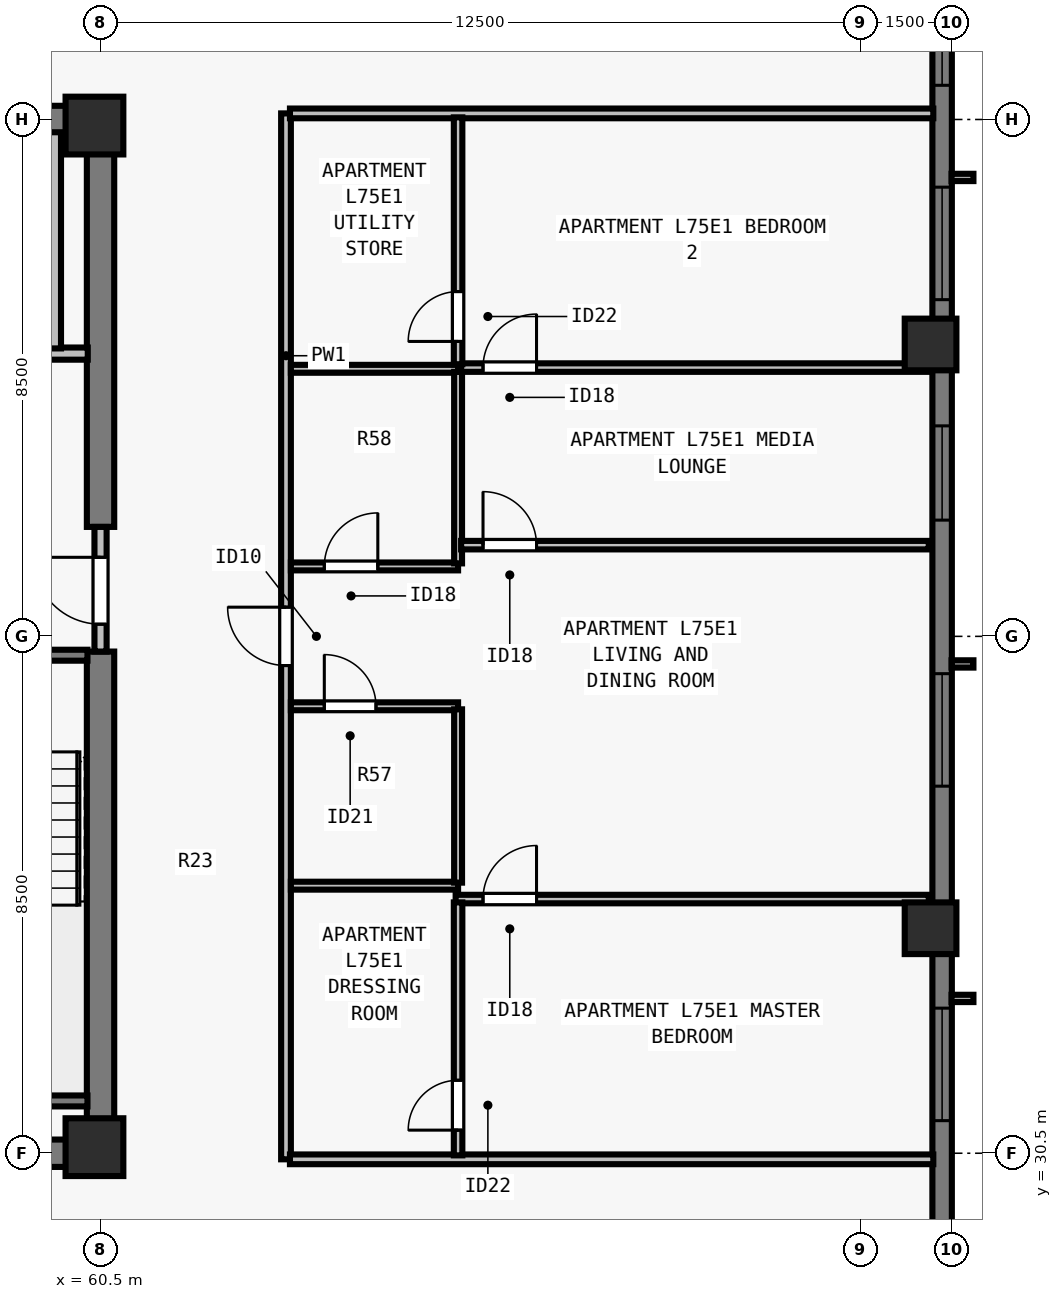
"""IFC4 building model, lengths in metres.
Left out: names, types, materials, properties, quantities, classifications, styles, units other than length and angle.
Written with IfcOpenShell. Run it as: python <this file> out.ifc"""

import sys

from ifc_helpers import new_model, si_unit, direction, frame, frame_2d, origin, origin_2d, place, context, subcontext, project, spatial, rectangle, extrude, element, fill, save


model = new_model("IFC4")
c1 = context("Model", 3, precision=1e-05, world=origin(), true_north=direction((0.0, 1.0)))
c2 = subcontext(c1, "Body", "Model", "MODEL_VIEW")
j1 = project(units=[si_unit("LENGTHUNIT", "METRE"), si_unit("PLANEANGLEUNIT", "RADIAN")], contexts=[c1])
p1 = place(None, origin())
s1 = spatial("IfcSite", under=j1, at=p1, CompositionType="ELEMENT")
p2 = place(p1, origin())
s2 = spatial("IfcBuilding", under=s1, at=p2, CompositionType="ELEMENT")
p3 = place(p2, frame((0.0, 0.0, 272.5)))
s3 = spatial("IfcBuildingStorey", under=s2, at=p3, CompositionType="ELEMENT", Elevation=272.5)
for number, where, z_axis, x_axis in (
    (1, (60.4, 30.6, 0.0), (0.0, 0.0, 1.0), (1.0, 0.0, 0.0)),
    (2, (60.4, 47.4, 0.0), (0.0, 0.0, 1.0), (1.0, 0.0, 0.0)),
):
    element("IfcColumn", number, at=place(p3, frame(where, z_axis=z_axis, x_axis=x_axis)), inside=s3, PredefinedType="COLUMN", context=c2, shape_type="SweptSolid", body=[
        extrude(rectangle(XDim=0.95, YDim=0.95, at=origin_2d()), origin(), (0.0, 0.0, 1.0), 3.5),
    ])
for number, where, z_axis, x_axis in (
    (3, (74.15, 34.2, 0.0), (0.0, 0.0, 1.0), (0.0, 1.0, 0.0)),
    (4, (74.15, 43.8, 0.0), (0.0, 0.0, 1.0), (0.0, 1.0, 0.0)),
):
    element("IfcColumn", number, at=place(p3, frame(where, z_axis=z_axis, x_axis=x_axis)), inside=s3, PredefinedType="COLUMN", context=c2, shape_type="SweptSolid", body=[
        extrude(rectangle(XDim=0.85, YDim=0.85, at=origin_2d()), origin(), (0.0, 0.0, 1.0), 3.5),
    ])
p4 = place(p3, frame((74.34, 56.5, 0.0), z_axis=(0.0, 0.0, 1.0), x_axis=(0.0, -1.0, 0.0)))
e5 = element("IfcWall", 5, at=p4, inside=s3, PredefinedType="SOLIDWALL", context=c2, shape_type="SweptSolid", body=[
    extrude(rectangle(XDim=34.702, YDim=0.32, at=frame_2d((17.351, 0.0))), origin(), (0.0, 0.0, 1.0), 3.24),
])
p5 = place(p4, frame((6.888, 0.0, 0.8)))
e6 = element("IfcOpeningElement", 6, at=p5, cuts=e5, PredefinedType="OPENING", context=c2, shape_type="SweptSolid", body=[
    extrude(rectangle(XDim=1.55, YDim=1.628, at=frame_2d((0.775, 0.814))), frame((0.0, 0.17, 0.0), z_axis=(0.0, -1.0, 0.0), x_axis=(1.0, 0.0, 0.0)), (0.0, 0.0, 1.0), 0.34),
])
p6 = place(p4, frame((10.113, 0.0, 0.8)))
e7 = element("IfcOpeningElement", 7, at=p6, cuts=e5, PredefinedType="OPENING", context=c2, shape_type="SweptSolid", body=[
    extrude(rectangle(XDim=1.85, YDim=1.628, at=frame_2d((0.925, 0.814))), frame((0.0, 0.17, 0.0), z_axis=(0.0, -1.0, 0.0), x_axis=(1.0, 0.0, 0.0)), (0.0, 0.0, 1.0), 0.34),
])
p7 = place(p4, frame((14.038, 0.0, 0.8)))
e8 = element("IfcOpeningElement", 8, at=p7, cuts=e5, PredefinedType="OPENING", context=c2, shape_type="SweptSolid", body=[
    extrude(rectangle(XDim=1.55, YDim=1.628, at=frame_2d((0.775, 0.814))), frame((0.0, 0.17, 0.0), z_axis=(0.0, -1.0, 0.0), x_axis=(1.0, 0.0, 0.0)), (0.0, 0.0, 1.0), 0.34),
])
p8 = place(p4, frame((18.114, 0.0, 0.8)))
e9 = element("IfcOpeningElement", 9, at=p8, cuts=e5, PredefinedType="OPENING", context=c2, shape_type="SweptSolid", body=[
    extrude(rectangle(XDim=1.85, YDim=1.628, at=frame_2d((0.925, 0.814))), frame((0.0, 0.17, 0.0), z_axis=(0.0, -1.0, 0.0), x_axis=(1.0, 0.0, 0.0)), (0.0, 0.0, 1.0), 0.34),
])
p9 = place(p4, frame((23.614, 0.0, 0.8)))
e10 = element("IfcOpeningElement", 10, at=p9, cuts=e5, PredefinedType="OPENING", context=c2, shape_type="SweptSolid", body=[
    extrude(rectangle(XDim=1.85, YDim=1.628, at=frame_2d((0.925, 0.814))), frame((0.0, 0.17, 0.0), z_axis=(0.0, -1.0, 0.0), x_axis=(1.0, 0.0, 0.0)), (0.0, 0.0, 1.0), 0.34),
])
p10 = place(p4, frame((29.24, 0.0, 0.8)))
e11 = element("IfcOpeningElement", 11, at=p10, cuts=e5, PredefinedType="OPENING", context=c2, shape_type="SweptSolid", body=[
    extrude(rectangle(XDim=1.55, YDim=1.628, at=frame_2d((0.775, 0.814))), frame((0.0, 0.17, 0.0), z_axis=(0.0, -1.0, 0.0), x_axis=(1.0, 0.0, 0.0)), (0.0, 0.0, 1.0), 0.34),
])
for number, where, z_axis, x_axis in (
    (12, (43.275, 30.5, 0.0), (0.0, 0.0, 1.0), (1.0, 0.0, 0.0)),
    (13, (43.275, 47.5, 0.0), (0.0, 0.0, 1.0), (1.0, 0.0, 0.0)),
):
    element("IfcWall", number, at=place(p3, frame(where, z_axis=z_axis, x_axis=x_axis)), inside=s3, PredefinedType="SHEAR", context=c2, shape_type="SweptSolid", body=[
        extrude(rectangle(XDim=17.45, YDim=0.45, at=frame_2d((8.725, 0.0))), origin(), (0.0, 0.0, 1.0), 3.24),
    ])
p11 = place(p3, frame((60.5, 30.715, 0.0), z_axis=(0.0, 0.0, 1.0), x_axis=(0.0, 1.0, 0.0)))
e14 = element("IfcWall", 14, at=p11, inside=s3, PredefinedType="SHEAR", context=c2, shape_type="SweptSolid", body=[
    extrude(rectangle(XDim=8.035, YDim=0.45, at=frame_2d((4.018, 0.0))), origin(), (0.0, 0.0, 1.0), 3.24),
])
p12 = place(p3, frame((60.5, 40.8, 0.0), z_axis=(0.0, 0.0, 1.0), x_axis=(0.0, 1.0, 0.0)))
e15 = element("IfcWall", 15, at=p12, inside=s3, PredefinedType="SHEAR", context=c2, shape_type="SweptSolid", body=[
    extrude(rectangle(XDim=6.485, YDim=0.45, at=frame_2d((3.242, 0.0))), origin(), (0.0, 0.0, 1.0), 3.24),
])
p13 = place(p3, frame((60.5, 38.75, 0.0), z_axis=(0.0, 0.0, 1.0), x_axis=(0.0, 1.0, 0.0)))
e16 = element("IfcWall", 16, at=p13, inside=s3, PredefinedType="SOLIDWALL", context=c2, shape_type="SweptSolid", body=[
    extrude(rectangle(XDim=2.05, YDim=0.2, at=frame_2d((1.025, 0.0))), origin(), (0.0, 0.0, 1.0), 3.24),
])
p14 = place(p13, frame((0.45, 0.0, 0.0)))
e17 = element("IfcOpeningElement", 17, at=p14, cuts=e16, PredefinedType="OPENING", context=c2, shape_type="SweptSolid", body=[
    extrude(rectangle(XDim=1.1, YDim=2.15, at=frame_2d((0.55, 1.075))), frame((0.0, 0.11, 0.0), z_axis=(0.0, -1.0, 0.0), x_axis=(1.0, 0.0, 0.0)), (0.0, 0.0, 1.0), 0.22),
])
p15 = place(p3, frame((56.735, 43.65, 0.0), z_axis=(0.0, 0.0, 1.0), x_axis=(1.0, 0.0, 0.0)))
e18 = element("IfcWall", 18, at=p15, inside=s3, PredefinedType="SOLIDWALL", context=c2, shape_type="SweptSolid", body=[
    extrude(rectangle(XDim=3.555, YDim=0.2, at=frame_2d((1.777, 0.0))), origin(), (0.0, 0.0, 1.0), 3.24),
])
p16 = place(p15, frame((1.295, 0.0, 0.0)))
e19 = element("IfcOpeningElement", 19, at=p16, cuts=e18, PredefinedType="OPENING", context=c2, shape_type="SweptSolid", body=[
    extrude(rectangle(XDim=1.1, YDim=2.2, at=frame_2d((0.55, 1.1))), frame((0.0, 0.11, 0.0), z_axis=(0.0, -1.0, 0.0), x_axis=(1.0, 0.0, 0.0)), (0.0, 0.0, 1.0), 0.22),
])
p17 = place(p3, frame((59.75, 43.735, 0.0), z_axis=(0.0, 0.0, 1.0), x_axis=(0.0, 1.0, 0.0)))
e20 = element("IfcWall", 20, at=p17, inside=s3, PredefinedType="SOLIDWALL", context=c2, shape_type="SweptSolid", body=[
    extrude(rectangle(XDim=3.555, YDim=0.2, at=frame_2d((1.777, 0.0))), origin(), (0.0, 0.0, 1.0), 3.24),
])
p18 = place(p3, frame((63.55, 30.4, 0.0), z_axis=(0.0, 0.0, 1.0), x_axis=(0.0, 1.0, 0.0)))
e21 = element("IfcWall", 21, at=p18, inside=s3, PredefinedType="PARTITIONING", context=c2, shape_type="SweptSolid", body=[
    extrude(rectangle(XDim=17.2, YDim=0.16, at=frame_2d((8.6, 0.0))), origin(), (0.0, 0.0, 1.0), 3.24),
])
p19 = place(p18, frame((8.12, 0.0, 0.0)))
e22 = element("IfcOpeningElement", 22, at=p19, cuts=e21, PredefinedType="OPENING", context=c2, shape_type="SweptSolid", body=[
    extrude(rectangle(XDim=0.96, YDim=2.18, at=frame_2d((0.48, 1.09))), frame((0.0, 0.09, 0.0), z_axis=(0.0, -1.0, 0.0), x_axis=(1.0, 0.0, 0.0)), (0.0, 0.0, 1.0), 0.18),
])
for number, where, z_axis, x_axis in (
    (23, (63.615, 30.4, 0.0), (0.0, 0.0, 1.0), (1.0, 0.0, 0.0)),
    (24, (63.615, 47.6, 0.0), (0.0, 0.0, 1.0), (1.0, 0.0, 0.0)),
):
    element("IfcWall", number, at=place(p3, frame(where, z_axis=z_axis, x_axis=x_axis)), inside=s3, PredefinedType="PARTITIONING", context=c2, shape_type="SweptSolid", body=[
        extrude(rectangle(XDim=10.58, YDim=0.16, at=frame_2d((5.29, 0.0))), origin(), (0.0, 0.0, 1.0), 3.24),
    ])
p20 = place(p3, frame((63.63, 34.9, 0.0), z_axis=(0.0, 0.0, 1.0), x_axis=(1.0, 0.0, 0.0)))
e25 = element("IfcWall", 25, at=p20, inside=s3, PredefinedType="PLUMBINGWALL", context=c2, shape_type="SweptSolid", body=[
    extrude(rectangle(XDim=2.75, YDim=0.13, at=frame_2d((1.375, 0.0))), origin(), (0.0, 0.0, 1.0), 3.24),
])
p21 = place(p3, frame((63.63, 37.85, 0.0), z_axis=(0.0, 0.0, 1.0), x_axis=(1.0, 0.0, 0.0)))
e26 = element("IfcWall", 26, at=p21, inside=s3, PredefinedType="PLUMBINGWALL", context=c2, shape_type="SweptSolid", body=[
    extrude(rectangle(XDim=2.75, YDim=0.13, at=frame_2d((1.375, 0.0))), origin(), (0.0, 0.0, 1.0), 3.24),
])
p22 = place(p21, frame((0.55, 0.0, 0.0)))
e27 = element("IfcOpeningElement", 27, at=p22, cuts=e26, PredefinedType="OPENING", context=c2, shape_type="SweptSolid", body=[
    extrude(rectangle(XDim=0.85, YDim=2.08, at=frame_2d((0.425, 1.04))), frame((0.0, 0.075, 0.0), z_axis=(0.0, -1.0, 0.0), x_axis=(1.0, 0.0, 0.0)), (0.0, 0.0, 1.0), 0.15),
])
p23 = place(p3, frame((66.38, 34.95, 0.0), z_axis=(0.0, 0.0, 1.0), x_axis=(0.0, 1.0, 0.0)))
e28 = element("IfcWall", 28, at=p23, inside=s3, PredefinedType="PLUMBINGWALL", context=c2, shape_type="SweptSolid", body=[
    extrude(rectangle(XDim=2.85, YDim=0.13, at=frame_2d((1.425, 0.0))), origin(), (0.0, 0.0, 1.0), 3.24),
])
p24 = place(p3, frame((63.63, 43.4, 0.0), z_axis=(0.0, 0.0, 1.0), x_axis=(1.0, 0.0, 0.0)))
e29 = element("IfcWall", 29, at=p24, inside=s3, PredefinedType="PLUMBINGWALL", context=c2, shape_type="SweptSolid", body=[
    extrude(rectangle(XDim=2.75, YDim=0.13, at=frame_2d((1.375, 0.0))), origin(), (0.0, 0.0, 1.0), 3.24),
])
p25 = place(p3, frame((63.63, 40.15, 0.0), z_axis=(0.0, 0.0, 1.0), x_axis=(1.0, 0.0, 0.0)))
e30 = element("IfcWall", 30, at=p25, inside=s3, PredefinedType="PLUMBINGWALL", context=c2, shape_type="SweptSolid", body=[
    extrude(rectangle(XDim=2.75, YDim=0.13, at=frame_2d((1.375, 0.0))), origin(), (0.0, 0.0, 1.0), 3.24),
])
p26 = place(p25, frame((0.55, 0.0, 0.0)))
e31 = element("IfcOpeningElement", 31, at=p26, cuts=e30, PredefinedType="OPENING", context=c2, shape_type="SweptSolid", body=[
    extrude(rectangle(XDim=0.88, YDim=2.1, at=frame_2d((0.44, 1.05))), frame((0.0, 0.075, 0.0), z_axis=(0.0, -1.0, 0.0), x_axis=(1.0, 0.0, 0.0)), (0.0, 0.0, 1.0), 0.15),
])
p27 = place(p3, frame((66.38, 40.2, 0.0), z_axis=(0.0, 0.0, 1.0), x_axis=(0.0, 1.0, 0.0)))
e32 = element("IfcWall", 32, at=p27, inside=s3, PredefinedType="PLUMBINGWALL", context=c2, shape_type="SweptSolid", body=[
    extrude(rectangle(XDim=3.15, YDim=0.13, at=frame_2d((1.575, 0.0))), origin(), (0.0, 0.0, 1.0), 3.24),
])
p28 = place(p3, frame((66.34, 34.68, 0.0), z_axis=(0.0, 0.0, 1.0), x_axis=(1.0, 0.0, 0.0)))
e33 = element("IfcWall", 33, at=p28, inside=s3, PredefinedType="PARTITIONING", context=c2, shape_type="SweptSolid", body=[
    extrude(rectangle(XDim=7.78, YDim=0.14, at=frame_2d((3.89, 0.0))), origin(), (0.0, 0.0, 1.0), 3.24),
])
p29 = place(p28, frame((0.45, 0.0, 0.0)))
e34 = element("IfcOpeningElement", 34, at=p29, cuts=e33, PredefinedType="OPENING", context=c2, shape_type="SweptSolid", body=[
    extrude(rectangle(XDim=0.88, YDim=2.1, at=frame_2d((0.44, 1.05))), frame((0.0, 0.08, 0.0), z_axis=(0.0, -1.0, 0.0), x_axis=(1.0, 0.0, 0.0)), (0.0, 0.0, 1.0), 0.16),
])
p30 = place(p3, frame((66.38, 30.465, 0.0), z_axis=(0.0, 0.0, 1.0), x_axis=(0.0, 1.0, 0.0)))
e35 = element("IfcWall", 35, at=p30, inside=s3, PredefinedType="PARTITIONING", context=c2, shape_type="SweptSolid", body=[
    extrude(rectangle(XDim=4.16, YDim=0.14, at=frame_2d((2.08, 0.0))), origin(), (0.0, 0.0, 1.0), 3.24),
])
p31 = place(p30, frame((0.415, 0.0, 0.0)))
e36 = element("IfcOpeningElement", 36, at=p31, cuts=e35, PredefinedType="OPENING", context=c2, shape_type="SweptSolid", body=[
    extrude(rectangle(XDim=0.82, YDim=2.1, at=frame_2d((0.41, 1.05))), frame((0.0, 0.08, 0.0), z_axis=(0.0, -1.0, 0.0), x_axis=(1.0, 0.0, 0.0)), (0.0, 0.0, 1.0), 0.16),
])
p32 = place(p3, frame((66.43, 43.42, 0.0), z_axis=(0.0, 0.0, 1.0), x_axis=(1.0, 0.0, 0.0)))
e37 = element("IfcWall", 37, at=p32, inside=s3, PredefinedType="PARTITIONING", context=c2, shape_type="SweptSolid", body=[
    extrude(rectangle(XDim=7.69, YDim=0.14, at=frame_2d((3.845, 0.0))), origin(), (0.0, 0.0, 1.0), 3.24),
])
p33 = place(p32, frame((0.36, 0.0, 0.0)))
e38 = element("IfcOpeningElement", 38, at=p33, cuts=e37, PredefinedType="OPENING", context=c2, shape_type="SweptSolid", body=[
    extrude(rectangle(XDim=0.88, YDim=2.1, at=frame_2d((0.44, 1.05))), frame((0.0, 0.08, 0.0), z_axis=(0.0, -1.0, 0.0), x_axis=(1.0, 0.0, 0.0)), (0.0, 0.0, 1.0), 0.16),
])
p34 = place(p3, frame((66.38, 43.475, 0.0), z_axis=(0.0, 0.0, 1.0), x_axis=(0.0, 1.0, 0.0)))
e39 = element("IfcWall", 39, at=p34, inside=s3, PredefinedType="PARTITIONING", context=c2, shape_type="SweptSolid", body=[
    extrude(rectangle(XDim=4.06, YDim=0.14, at=frame_2d((2.03, 0.0))), origin(), (0.0, 0.0, 1.0), 3.24),
])
p35 = place(p34, frame((0.375, 0.0, 0.0)))
e40 = element("IfcOpeningElement", 40, at=p35, cuts=e39, PredefinedType="OPENING", context=c2, shape_type="SweptSolid", body=[
    extrude(rectangle(XDim=0.82, YDim=2.1, at=frame_2d((0.41, 1.05))), frame((0.0, 0.08, 0.0), z_axis=(0.0, -1.0, 0.0), x_axis=(1.0, 0.0, 0.0)), (0.0, 0.0, 1.0), 0.16),
])
p36 = place(p3, frame((66.43, 40.5, 0.0), z_axis=(0.0, 0.0, 1.0), x_axis=(1.0, 0.0, 0.0)))
e41 = element("IfcWall", 41, at=p36, inside=s3, PredefinedType="PARTITIONING", context=c2, shape_type="SweptSolid", body=[
    extrude(rectangle(XDim=7.69, YDim=0.14, at=frame_2d((3.845, 0.0))), origin(), (0.0, 0.0, 1.0), 3.24),
])
p37 = place(p36, frame((0.36, 0.0, 0.0)))
e42 = element("IfcOpeningElement", 42, at=p37, cuts=e41, PredefinedType="OPENING", context=c2, shape_type="SweptSolid", body=[
    extrude(rectangle(XDim=0.88, YDim=2.1, at=frame_2d((0.44, 1.05))), frame((0.0, 0.08, 0.0), z_axis=(0.0, -1.0, 0.0), x_axis=(1.0, 0.0, 0.0)), (0.0, 0.0, 1.0), 0.16),
])
p38 = place(p3, frame((57.005, 38.69, 0.0), z_axis=(0.0, 0.0, 1.0), x_axis=(1.0, 0.0, 0.0)))
e43 = element("IfcWall", 43, at=p38, inside=s3, PredefinedType="SOLIDWALL", context=c2, shape_type="SweptSolid", body=[
    extrude(rectangle(XDim=3.28, YDim=0.18, at=frame_2d((1.64, 0.0))), origin(), (0.0, 0.0, 1.0), 3.24),
])
p39 = place(p38, frame((1.165, 0.0, 0.0)))
e44 = element("IfcOpeningElement", 44, at=p39, cuts=e43, PredefinedType="OPENING", context=c2, shape_type="SweptSolid", body=[
    extrude(rectangle(XDim=0.95, YDim=2.15, at=frame_2d((0.475, 1.075))), frame((0.0, 0.1, 0.0), z_axis=(0.0, -1.0, 0.0), x_axis=(1.0, 0.0, 0.0)), (0.0, 0.0, 1.0), 0.2),
])
p40 = place(p3, frame((57.005, 31.36, 0.0), z_axis=(0.0, 0.0, 1.0), x_axis=(1.0, 0.0, 0.0)))
e45 = element("IfcWall", 45, at=p40, inside=s3, PredefinedType="SOLIDWALL", context=c2, shape_type="SweptSolid", body=[
    extrude(rectangle(XDim=3.28, YDim=0.18, at=frame_2d((1.64, 0.0))), origin(), (0.0, 0.0, 1.0), 3.24),
])
p41 = place(p5, origin())
e46 = element("IfcWindow", 46, at=p41, inside=s3, PartitioningType="SINGLE_PANEL", PredefinedType="WINDOW", context=c2, shape_type="SweptSolid", body=[
    extrude(rectangle(XDim=1.55, YDim=1.628, at=frame_2d((0.775, 0.814))), frame((0.0, -0.05, 0.0), z_axis=(0.0, -1.0, 0.0), x_axis=(1.0, 0.0, 0.0)), (0.0, 0.0, 1.0), 0.06),
])
fill(e6, e46)
p42 = place(p6, origin())
e47 = element("IfcWindow", 47, at=p42, inside=s3, PartitioningType="SINGLE_PANEL", PredefinedType="WINDOW", context=c2, shape_type="SweptSolid", body=[
    extrude(rectangle(XDim=1.85, YDim=1.628, at=frame_2d((0.925, 0.814))), frame((0.0, -0.05, 0.0), z_axis=(0.0, -1.0, 0.0), x_axis=(1.0, 0.0, 0.0)), (0.0, 0.0, 1.0), 0.06),
])
fill(e7, e47)
p43 = place(p7, origin())
e48 = element("IfcWindow", 48, at=p43, inside=s3, PartitioningType="SINGLE_PANEL", PredefinedType="WINDOW", context=c2, shape_type="SweptSolid", body=[
    extrude(rectangle(XDim=1.55, YDim=1.628, at=frame_2d((0.775, 0.814))), frame((0.0, -0.05, 0.0), z_axis=(0.0, -1.0, 0.0), x_axis=(1.0, 0.0, 0.0)), (0.0, 0.0, 1.0), 0.06),
])
fill(e8, e48)
p44 = place(p8, origin())
e49 = element("IfcWindow", 49, at=p44, inside=s3, PartitioningType="SINGLE_PANEL", PredefinedType="WINDOW", context=c2, shape_type="SweptSolid", body=[
    extrude(rectangle(XDim=1.85, YDim=1.628, at=frame_2d((0.925, 0.814))), frame((0.0, -0.05, 0.0), z_axis=(0.0, -1.0, 0.0), x_axis=(1.0, 0.0, 0.0)), (0.0, 0.0, 1.0), 0.06),
])
fill(e9, e49)
p45 = place(p9, origin())
e50 = element("IfcWindow", 50, at=p45, inside=s3, PartitioningType="SINGLE_PANEL", PredefinedType="WINDOW", context=c2, shape_type="SweptSolid", body=[
    extrude(rectangle(XDim=1.85, YDim=1.628, at=frame_2d((0.925, 0.814))), frame((0.0, -0.05, 0.0), z_axis=(0.0, -1.0, 0.0), x_axis=(1.0, 0.0, 0.0)), (0.0, 0.0, 1.0), 0.06),
])
fill(e10, e50)
p46 = place(p14, origin())
e51 = element("IfcDoor", 51, at=p46, inside=s3, OperationType="SINGLE_SWING_RIGHT", PredefinedType="DOOR", context=c2, shape_type="SweptSolid", body=[
    extrude(rectangle(XDim=1.1, YDim=2.15, at=frame_2d((0.55, 1.075))), frame((0.0, 0.025, 0.0), z_axis=(0.0, -1.0, 0.0), x_axis=(1.0, 0.0, 0.0)), (0.0, 0.0, 1.0), 0.05),
])
fill(e17, e51)
p47 = place(p22, origin())
e52 = element("IfcDoor", 52, at=p47, inside=s3, OperationType="SINGLE_SWING_LEFT", PredefinedType="DOOR", context=c2, shape_type="SweptSolid", body=[
    extrude(rectangle(XDim=0.85, YDim=2.08, at=frame_2d((0.425, 1.04))), frame((0.0, 0.025, 0.0), z_axis=(0.0, -1.0, 0.0), x_axis=(1.0, 0.0, 0.0)), (0.0, 0.0, 1.0), 0.05),
])
fill(e27, e52)
p48 = place(p26, origin())
e53 = element("IfcDoor", 53, at=p48, inside=s3, OperationType="SINGLE_SWING_RIGHT", PredefinedType="DOOR", context=c2, shape_type="SweptSolid", body=[
    extrude(rectangle(XDim=0.88, YDim=2.1, at=frame_2d((0.44, 1.05))), frame((0.0, 0.025, 0.0), z_axis=(0.0, -1.0, 0.0), x_axis=(1.0, 0.0, 0.0)), (0.0, 0.0, 1.0), 0.05),
])
fill(e31, e53)
p49 = place(p31, origin())
e54 = element("IfcDoor", 54, at=p49, inside=s3, OperationType="SINGLE_SWING_LEFT", PredefinedType="DOOR", context=c2, shape_type="SweptSolid", body=[
    extrude(rectangle(XDim=0.82, YDim=2.1, at=frame_2d((0.41, 1.05))), frame((0.0, 0.025, 0.0), z_axis=(0.0, -1.0, 0.0), x_axis=(1.0, 0.0, 0.0)), (0.0, 0.0, 1.0), 0.05),
])
fill(e36, e54)
p50 = place(p29, origin())
e55 = element("IfcDoor", 55, at=p50, inside=s3, OperationType="SINGLE_SWING_RIGHT", PredefinedType="DOOR", context=c2, shape_type="SweptSolid", body=[
    extrude(rectangle(XDim=0.88, YDim=2.1, at=frame_2d((0.44, 1.05))), frame((0.0, 0.025, 0.0), z_axis=(0.0, -1.0, 0.0), x_axis=(1.0, 0.0, 0.0)), (0.0, 0.0, 1.0), 0.05),
])
fill(e34, e55)
p51 = place(p35, origin())
e56 = element("IfcDoor", 56, at=p51, inside=s3, OperationType="SINGLE_SWING_LEFT", PredefinedType="DOOR", context=c2, shape_type="SweptSolid", body=[
    extrude(rectangle(XDim=0.82, YDim=2.1, at=frame_2d((0.41, 1.05))), frame((0.0, 0.025, 0.0), z_axis=(0.0, -1.0, 0.0), x_axis=(1.0, 0.0, 0.0)), (0.0, 0.0, 1.0), 0.05),
])
fill(e40, e56)
p52 = place(p33, origin())
e57 = element("IfcDoor", 57, at=p52, inside=s3, OperationType="SINGLE_SWING_RIGHT", PredefinedType="DOOR", context=c2, shape_type="SweptSolid", body=[
    extrude(rectangle(XDim=0.88, YDim=2.1, at=frame_2d((0.44, 1.05))), frame((0.0, 0.025, 0.0), z_axis=(0.0, -1.0, 0.0), x_axis=(1.0, 0.0, 0.0)), (0.0, 0.0, 1.0), 0.05),
])
fill(e38, e57)
p53 = place(p37, origin())
e58 = element("IfcDoor", 58, at=p53, inside=s3, OperationType="SINGLE_SWING_LEFT", PredefinedType="DOOR", context=c2, shape_type="SweptSolid", body=[
    extrude(rectangle(XDim=0.88, YDim=2.1, at=frame_2d((0.44, 1.05))), frame((0.0, 0.025, 0.0), z_axis=(0.0, -1.0, 0.0), x_axis=(1.0, 0.0, 0.0)), (0.0, 0.0, 1.0), 0.05),
])
fill(e42, e58)
p54 = place(p19, origin())
e59 = element("IfcDoor", 59, at=p54, inside=s3, OperationType="SINGLE_SWING_RIGHT", PredefinedType="DOOR", context=c2, shape_type="SweptSolid", body=[
    extrude(rectangle(XDim=0.96, YDim=2.18, at=frame_2d((0.48, 1.09))), frame((0.0, 0.025, 0.0), z_axis=(0.0, -1.0, 0.0), x_axis=(1.0, 0.0, 0.0)), (0.0, 0.0, 1.0), 0.05),
])
fill(e22, e59)
save(model, sys.argv[1])
